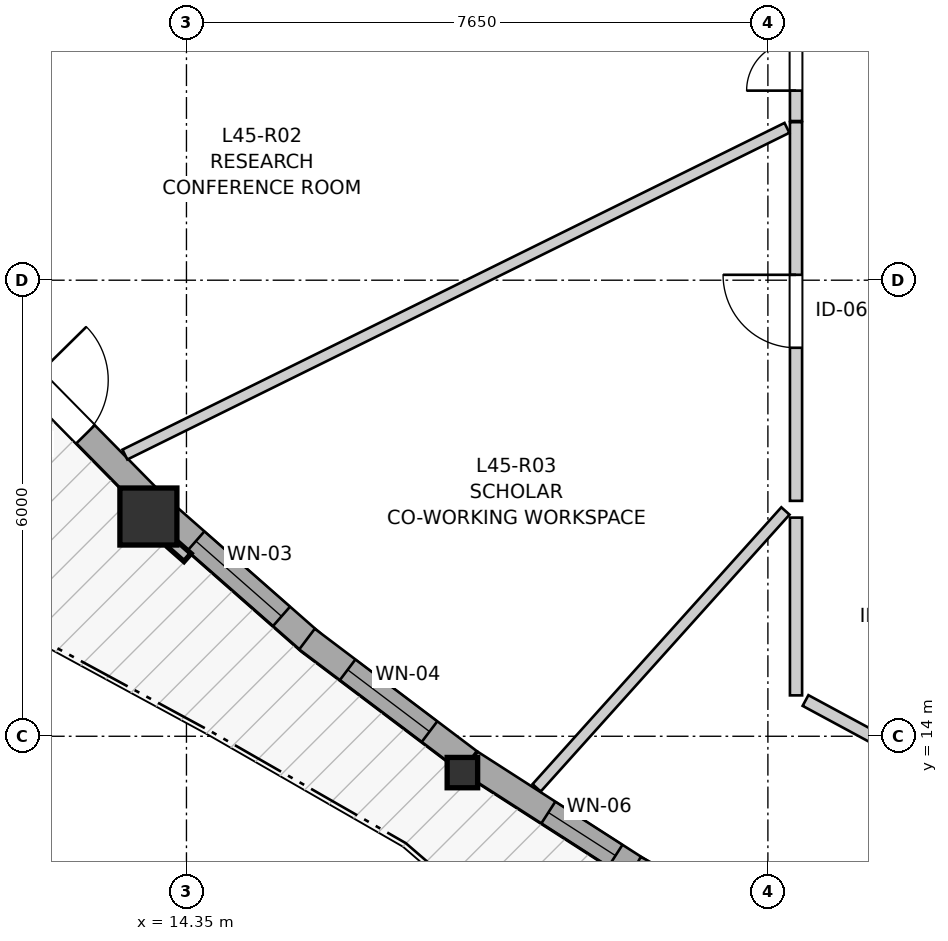
"""IFC4 building model, lengths in metres.
Left out: names, types, materials, properties, quantities, classifications, styles, units other than length and angle.
Written with IfcOpenShell. Run it as: python <this file> out.ifc"""

import sys

from ifc_helpers import new_model, si_unit, direction, frame, frame_2d, origin, origin_2d, place, context, subcontext, project, spatial, rectangle, i_section, extrude, source, transform, mapped, element, fill, save


model = new_model("IFC4")
c1 = context("Model", 3, precision=1e-05, world=origin(), true_north=direction((0.0, 1.0)))
c2 = subcontext(c1, "Body", "Model", "MODEL_VIEW")
j1 = project(units=[si_unit("LENGTHUNIT", "METRE"), si_unit("PLANEANGLEUNIT", "RADIAN")], contexts=[c1])
p1 = place(None, origin())
s1 = spatial("IfcSite", under=j1, at=p1, CompositionType="ELEMENT")
p2 = place(p1, origin())
s2 = spatial("IfcBuilding", under=s1, at=p2, CompositionType="ELEMENT")
p3 = place(p2, frame((0.0, 0.0, 152.2)))
s3 = spatial("IfcBuildingStorey", under=s2, at=p3, CompositionType="ELEMENT", Elevation=152.2)
m1 = source(origin(), c2, "Body", "SweptSolid", [
    extrude(rectangle(XDim=0.75, YDim=0.75, at=origin_2d()), origin(), (0.0, 0.0, 1.0), 2.935),
])
p4 = place(p3, frame((13.849, 16.891, 0.0), z_axis=(0.0, 0.0, 1.0), x_axis=(1.0, 0.0, 0.0)))
e1 = element("IfcColumn", 1, at=p4, inside=s3, PredefinedType="COLUMN", context=c2, shape_type="MappedRepresentation", body=[
    mapped(m1, transform((0.0, 0.0, 0.0), x_axis=(1.0, 0.0, 0.0), y_axis=(0.0, 1.0, 0.0), z_axis=(0.0, 0.0, 1.0), scale=1.0)),
])
m2 = source(origin(), c2, "Body", "SweptSolid", [
    extrude(i_section(OverallWidth=0.401, OverallDepth=0.399, WebThickness=0.023, FlangeThickness=0.036, FilletRadius=0.015, at=origin_2d()), origin(), (0.0, 0.0, 1.0), 2.935),
])
p5 = place(p3, frame((17.98, 13.522, 0.0), z_axis=(0.0, 0.0, 1.0), x_axis=(1.0, 0.0, 0.0)))
e2 = element("IfcColumn", 2, at=p5, inside=s3, PredefinedType="PILASTER", context=c2, shape_type="MappedRepresentation", body=[
    mapped(m2, transform((0.0, 0.0, 0.0), x_axis=(1.0, 0.0, 0.0), y_axis=(0.0, 1.0, 0.0), z_axis=(0.0, 0.0, 1.0), scale=1.0)),
])
p6 = place(p3, frame((12.031, 18.98, 0.0), z_axis=(0.0, 0.0, 1.0), x_axis=(0.701518749222, -0.712650997677, 0.0)))
e3 = element("IfcWall", 3, at=p6, inside=s3, PredefinedType="SOLIDWALL", context=c2, shape_type="SweptSolid", body=[
    extrude(rectangle(XDim=2.61, YDim=0.34, at=frame_2d((1.305, 0.0))), origin(), (0.0, 0.0, 1.0), 2.515),
])
p7 = place(p6, frame((0.413, 0.0, 0.0)))
e4 = element("IfcOpeningElement", 4, at=p7, cuts=e3, PredefinedType="OPENING", context=c2, shape_type="SweptSolid", body=[
    extrude(rectangle(XDim=1.0, YDim=2.1, at=frame_2d((0.5, 1.05))), frame((0.0, 0.18, 0.0), z_axis=(0.0, -1.0, 0.0), x_axis=(1.0, 0.0, 0.0)), (0.0, 0.0, 1.0), 0.36),
])
p8 = place(p3, frame((14.078, 16.916, 0.0), z_axis=(0.0, 0.0, 1.0), x_axis=(0.751177768463, -0.660099962253, 0.0)))
e5 = element("IfcWall", 5, at=p8, inside=s3, PredefinedType="SOLIDWALL", context=c2, shape_type="SweptSolid", body=[
    extrude(rectangle(XDim=2.565, YDim=0.34, at=frame_2d((1.283, 0.0))), origin(), (0.0, 0.0, 1.0), 2.515),
])
p9 = place(p8, frame((0.528, 0.0, 0.82)))
e6 = element("IfcOpeningElement", 6, at=p9, cuts=e5, PredefinedType="OPENING", context=c2, shape_type="SweptSolid", body=[
    extrude(rectangle(XDim=1.5, YDim=1.45, at=frame_2d((0.75, 0.725))), frame((0.0, 0.18, 0.0), z_axis=(0.0, -1.0, 0.0), x_axis=(1.0, 0.0, 0.0)), (0.0, 0.0, 1.0), 0.36),
])
p10 = place(p3, frame((15.936, 15.279, 0.0), z_axis=(0.0, 0.0, 1.0), x_axis=(0.798020729511, -0.602629998649, 0.0)))
e7 = element("IfcWall", 7, at=p10, inside=s3, PredefinedType="SOLIDWALL", context=c2, shape_type="SweptSolid", body=[
    extrude(rectangle(XDim=2.67, YDim=0.34, at=frame_2d((1.335, 0.0))), origin(), (0.0, 0.0, 1.0), 2.515),
])
p11 = place(p10, frame((0.67, 0.0, 0.82)))
e8 = element("IfcOpeningElement", 8, at=p11, cuts=e7, PredefinedType="OPENING", context=c2, shape_type="SweptSolid", body=[
    extrude(rectangle(XDim=1.35, YDim=1.45, at=frame_2d((0.675, 0.725))), frame((0.0, 0.18, 0.0), z_axis=(0.0, -1.0, 0.0), x_axis=(1.0, 0.0, 0.0)), (0.0, 0.0, 1.0), 0.36),
])
p12 = place(p3, frame((18.089, 13.654, 0.0), z_axis=(0.0, 0.0, 1.0), x_axis=(0.841241207466, -0.540659995617, 0.0)))
e9 = element("IfcWall", 9, at=p12, inside=s3, PredefinedType="SOLIDWALL", context=c2, shape_type="SweptSolid", body=[
    extrude(rectangle(XDim=2.655, YDim=0.34, at=frame_2d((1.328, 0.0))), origin(), (0.0, 0.0, 1.0), 2.515),
])
p13 = place(p12, frame((1.215, 0.0, 0.82)))
e10 = element("IfcOpeningElement", 10, at=p13, cuts=e9, PredefinedType="OPENING", context=c2, shape_type="SweptSolid", body=[
    extrude(rectangle(XDim=1.05, YDim=1.45, at=frame_2d((0.525, 0.725))), frame((0.0, 0.18, 0.0), z_axis=(0.0, -1.0, 0.0), x_axis=(1.0, 0.0, 0.0)), (0.0, 0.0, 1.0), 0.36),
])
p14 = place(p3, frame((20.246, 12.264, 0.0), z_axis=(0.0, 0.0, 1.0), x_axis=(0.879813837033, -0.475318432385, 0.0)))
e11 = element("IfcWall", 11, at=p14, inside=s3, PredefinedType="SOLIDWALL", context=c2, shape_type="SweptSolid", body=[
    extrude(rectangle(XDim=2.52, YDim=0.34, at=frame_2d((1.26, 0.0))), origin(), (0.0, 0.0, 1.0), 2.515),
])
p15 = place(p14, frame((0.74, 0.0, 0.82)))
e12 = element("IfcOpeningElement", 12, at=p15, cuts=e11, PredefinedType="OPENING", context=c2, shape_type="SweptSolid", body=[
    extrude(rectangle(XDim=1.05, YDim=1.45, at=frame_2d((0.525, 0.725))), frame((0.0, 0.18, 0.0), z_axis=(0.0, -1.0, 0.0), x_axis=(1.0, 0.0, 0.0)), (0.0, 0.0, 1.0), 0.36),
])
p16 = place(p3, frame((22.37, 17.097, 0.0), z_axis=(0.0, 0.0, 1.0), x_axis=(0.0, 1.0, 0.0)))
e13 = element("IfcWall", 13, at=p16, inside=s3, PredefinedType="PARTITIONING", context=c2, shape_type="SweptSolid", body=[
    extrude(rectangle(XDim=4.982, YDim=0.16, at=frame_2d((2.491, 0.0))), origin(), (0.0, 0.0, 1.0), 2.935),
])
p17 = place(p16, frame((2.014, 0.0, 0.0)))
e14 = element("IfcOpeningElement", 14, at=p17, cuts=e13, PredefinedType="OPENING", context=c2, shape_type="SweptSolid", body=[
    extrude(rectangle(XDim=0.96, YDim=2.1, at=frame_2d((0.48, 1.05))), frame((0.0, 0.09, 0.0), z_axis=(0.0, -1.0, 0.0), x_axis=(1.0, 0.0, 0.0)), (0.0, 0.0, 1.0), 0.18),
])
p18 = place(p3, frame((22.37, 22.094, 0.0), z_axis=(0.0, 0.0, 1.0), x_axis=(0.0, 1.0, 0.0)))
e15 = element("IfcWall", 15, at=p18, inside=s3, PredefinedType="PARTITIONING", context=c2, shape_type="SweptSolid", body=[
    extrude(rectangle(XDim=2.056, YDim=0.16, at=frame_2d((1.028, 0.0))), origin(), (0.0, 0.0, 1.0), 2.935),
])
p19 = place(p18, frame((0.4, 0.0, 0.0)))
e16 = element("IfcOpeningElement", 16, at=p19, cuts=e15, PredefinedType="OPENING", context=c2, shape_type="SweptSolid", body=[
    extrude(rectangle(XDim=1.3, YDim=2.1, at=frame_2d((0.65, 1.05))), frame((0.0, 0.09, 0.0), z_axis=(0.0, -1.0, 0.0), x_axis=(1.0, 0.0, 0.0)), (0.0, 0.0, 1.0), 0.18),
])
p20 = place(p3, frame((13.54, 17.706, 0.0), z_axis=(0.0, 0.0, 1.0), x_axis=(0.896762400541, 0.442512369291, 0.0)))
e17 = element("IfcWall", 17, at=p20, inside=s3, PredefinedType="PARTITIONING", context=c2, shape_type="SweptSolid", body=[
    extrude(rectangle(XDim=9.713, YDim=0.145, at=frame_2d((4.857, 0.0))), origin(), (0.0, 0.0, 1.0), 2.935),
])
p21 = place(p3, frame((18.957, 13.322, 0.0), z_axis=(0.0, 0.0, 1.0), x_axis=(0.66841369867, 0.743789706456, 0.0)))
e18 = element("IfcWall", 18, at=p21, inside=s3, PredefinedType="PARTITIONING", context=c2, shape_type="SweptSolid", body=[
    extrude(rectangle(XDim=4.897, YDim=0.145, at=frame_2d((2.449, 0.0))), origin(), (0.0, 0.0, 1.0), 2.935),
])
p22 = place(p3, frame((22.37, 14.538, 0.0), z_axis=(0.0, 0.0, 1.0), x_axis=(0.0, 1.0, 0.0)))
e19 = element("IfcWall", 19, at=p22, inside=s3, PredefinedType="PARTITIONING", context=c2, shape_type="SweptSolid", body=[
    extrude(rectangle(XDim=2.338, YDim=0.16, at=frame_2d((1.169, 0.0))), origin(), (0.0, 0.0, 1.0), 2.935),
])
p23 = place(p3, frame((22.495, 14.47, 0.0), z_axis=(0.0, 0.0, 1.0), x_axis=(0.879828765098, -0.475290799517, 0.0)))
e20 = element("IfcWall", 20, at=p23, inside=s3, PredefinedType="PARTITIONING", context=c2, shape_type="SweptSolid", body=[
    extrude(rectangle(XDim=1.625, YDim=0.16, at=frame_2d((0.812, 0.0))), origin(), (0.0, 0.0, 1.0), 2.935),
])
m3 = source(origin(), c2, "Body", "SweptSolid", [
    extrude(rectangle(XDim=1.5, YDim=1.45, at=frame_2d((0.75, 0.725))), frame((0.0, 0.03, 0.0), z_axis=(0.0, -1.0, 0.0), x_axis=(1.0, 0.0, 0.0)), (0.0, 0.0, 1.0), 0.06),
])
p24 = place(p9, origin())
e21 = element("IfcWindow", 21, at=p24, inside=s3, PartitioningType="SINGLE_PANEL", PredefinedType="WINDOW", context=c2, shape_type="MappedRepresentation", body=[
    mapped(m3, transform((0.0, 0.0, 0.0), x_axis=(1.0, 0.0, 0.0), y_axis=(0.0, 1.0, 0.0), z_axis=(0.0, 0.0, 1.0), scale=1.0)),
])
fill(e6, e21)
m4 = source(origin(), c2, "Body", "SweptSolid", [
    extrude(rectangle(XDim=1.35, YDim=1.45, at=frame_2d((0.675, 0.725))), frame((0.0, 0.03, 0.0), z_axis=(0.0, -1.0, 0.0), x_axis=(1.0, 0.0, 0.0)), (0.0, 0.0, 1.0), 0.06),
])
p25 = place(p11, origin())
e22 = element("IfcWindow", 22, at=p25, inside=s3, PartitioningType="SINGLE_PANEL", PredefinedType="WINDOW", context=c2, shape_type="MappedRepresentation", body=[
    mapped(m4, transform((0.0, 0.0, 0.0), x_axis=(1.0, 0.0, 0.0), y_axis=(0.0, 1.0, 0.0), z_axis=(0.0, 0.0, 1.0), scale=1.0)),
])
fill(e8, e22)
m5 = source(origin(), c2, "Body", "SweptSolid", [
    extrude(rectangle(XDim=1.05, YDim=1.45, at=frame_2d((0.525, 0.725))), frame((0.0, 0.03, 0.0), z_axis=(0.0, -1.0, 0.0), x_axis=(1.0, 0.0, 0.0)), (0.0, 0.0, 1.0), 0.06),
])
p26 = place(p13, origin())
e23 = element("IfcWindow", 23, at=p26, inside=s3, PartitioningType="SINGLE_PANEL", PredefinedType="WINDOW", context=c2, shape_type="MappedRepresentation", body=[
    mapped(m5, transform((0.0, 0.0, 0.0), x_axis=(1.0, 0.0, 0.0), y_axis=(0.0, 1.0, 0.0), z_axis=(0.0, 0.0, 1.0), scale=1.0)),
])
fill(e10, e23)
m6 = source(origin(), c2, "Body", "SweptSolid", [
    extrude(rectangle(XDim=1.0, YDim=2.1, at=frame_2d((0.5, 1.05))), frame((0.0, 0.025, 0.0), z_axis=(0.0, -1.0, 0.0), x_axis=(1.0, 0.0, 0.0)), (0.0, 0.0, 1.0), 0.05),
])
p27 = place(p7, origin())
e24 = element("IfcDoor", 24, at=p27, inside=s3, OperationType="SINGLE_SWING_LEFT", PredefinedType="DOOR", context=c2, shape_type="MappedRepresentation", body=[
    mapped(m6, transform((0.0, 0.0, 0.0), x_axis=(1.0, 0.0, 0.0), y_axis=(0.0, 1.0, 0.0), z_axis=(0.0, 0.0, 1.0), scale=1.0)),
])
fill(e4, e24)
m7 = source(origin(), c2, "Body", "SweptSolid", [
    extrude(rectangle(XDim=0.96, YDim=2.1, at=frame_2d((0.48, 1.05))), frame((0.0, 0.025, 0.0), z_axis=(0.0, -1.0, 0.0), x_axis=(1.0, 0.0, 0.0)), (0.0, 0.0, 1.0), 0.05),
])
p28 = place(p17, origin())
e25 = element("IfcDoor", 25, at=p28, inside=s3, OperationType="SINGLE_SWING_RIGHT", PredefinedType="DOOR", context=c2, shape_type="MappedRepresentation", body=[
    mapped(m7, transform((0.0, 0.0, 0.0), x_axis=(1.0, 0.0, 0.0), y_axis=(0.0, 1.0, 0.0), z_axis=(0.0, 0.0, 1.0), scale=1.0)),
])
fill(e14, e25)
m8 = source(origin(), c2, "Body", "SweptSolid", [
    extrude(rectangle(XDim=1.3, YDim=2.1, at=frame_2d((0.65, 1.05))), frame((0.0, 0.025, 0.0), z_axis=(0.0, -1.0, 0.0), x_axis=(1.0, 0.0, 0.0)), (0.0, 0.0, 1.0), 0.05),
])
p29 = place(p19, origin())
e26 = element("IfcDoor", 26, at=p29, inside=s3, OperationType="DOUBLE_DOOR_SINGLE_SWING", PredefinedType="DOOR", context=c2, shape_type="MappedRepresentation", body=[
    mapped(m8, transform((0.0, 0.0, 0.0), x_axis=(1.0, 0.0, 0.0), y_axis=(0.0, 1.0, 0.0), z_axis=(0.0, 0.0, 1.0), scale=1.0)),
])
fill(e16, e26)
save(model, sys.argv[1])
